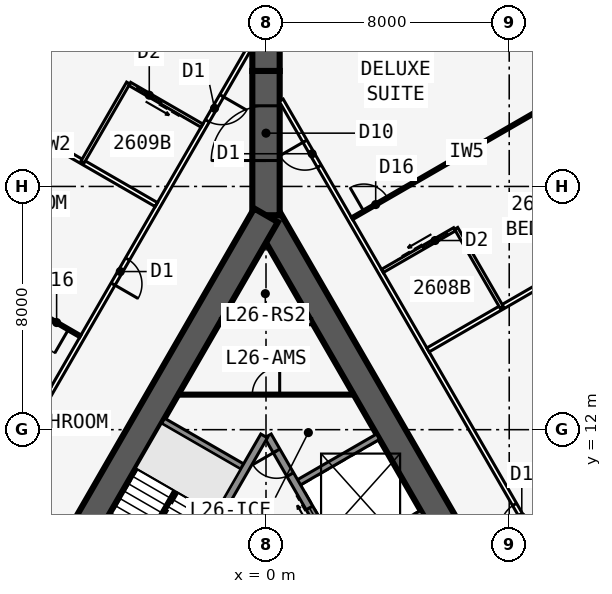
"""IFC4 building model, lengths in metres.
Left out: names, types, materials, properties, quantities, classifications, styles, units other than length and angle.
Written with IfcOpenShell. Run it as: python <this file> out.ifc"""

import sys

from ifc_helpers import new_model, si_unit, direction, frame, frame_2d, origin, place, context, subcontext, project, spatial, rectangle, extrude, element, fill, save


model = new_model("IFC4")
c1 = context("Model", 3, precision=1e-05, world=origin(), true_north=direction((0.0, 1.0)))
c2 = subcontext(c1, "Body", "Model", "MODEL_VIEW")
j1 = project(units=[si_unit("LENGTHUNIT", "METRE"), si_unit("PLANEANGLEUNIT", "RADIAN")], contexts=[c1])
p1 = place(None, origin())
s1 = spatial("IfcSite", under=j1, at=p1, CompositionType="ELEMENT")
p2 = place(p1, origin())
s2 = spatial("IfcBuilding", under=s1, at=p2, CompositionType="ELEMENT")
p3 = place(p2, frame((0.0, 0.0, 99.9)))
s3 = spatial("IfcBuildingStorey", under=s2, at=p3, CompositionType="ELEMENT", Elevation=99.9)
p4 = place(p3, frame((16.5, -9.526, 0.0), z_axis=(0.0, 0.0, 1.0), x_axis=(-0.499999749417, 0.866025548458, 0.0)))
e1 = element("IfcWall", 1, at=p4, inside=s3, PredefinedType="SHEAR", context=c2, shape_type="SweptSolid", body=[
    extrude(rectangle(XDim=33.0, YDim=0.9, at=frame_2d((16.5, 0.0))), origin(), (0.0, 0.0, 1.0), 3.4),
])
p5 = place(p4, frame((14.15, 0.0, 0.0)))
e2 = element("IfcOpeningElement", 2, at=p5, cuts=e1, PredefinedType="OPENING", context=c2, shape_type="SweptSolid", body=[
    extrude(rectangle(XDim=1.8, YDim=2.13, at=frame_2d((0.9, 1.065))), frame((0.0, 0.46, 0.0), z_axis=(0.0, -1.0, 0.0), x_axis=(1.0, 0.0, 0.0)), (0.0, 0.0, 1.0), 0.92),
])
p6 = place(p4, frame((12.6, 0.0, 0.0)))
e3 = element("IfcOpeningElement", 3, at=p6, cuts=e1, PredefinedType="OPENING", context=c2, shape_type="SweptSolid", body=[
    extrude(rectangle(XDim=1.0, YDim=2.13, at=frame_2d((0.5, 1.065))), frame((0.0, 0.46, 0.0), z_axis=(0.0, -1.0, 0.0), x_axis=(1.0, 0.0, 0.0)), (0.0, 0.0, 1.0), 0.92),
])
p7 = place(p3, frame((5.379, 2.586, 0.0), z_axis=(0.0, 0.0, 1.0), x_axis=(-0.500001375892, 0.866024609411, 0.0)))
e4 = element("IfcWall", 4, at=p7, inside=s3, PredefinedType="SOLIDWALL", context=c2, shape_type="SweptSolid", body=[
    extrude(rectangle(XDim=10.633, YDim=0.25, at=frame_2d((5.316, 0.0))), origin(), (0.0, 0.0, 1.0), 3.15),
])
p8 = place(p7, frame((9.164, 0.0, 0.0)))
e5 = element("IfcOpeningElement", 5, at=p8, cuts=e4, PredefinedType="OPENING", context=c2, shape_type="SweptSolid", body=[
    extrude(rectangle(XDim=0.9, YDim=2.13, at=frame_2d((0.45, 1.065))), frame((0.0, 0.135, 0.0), z_axis=(0.0, -1.0, 0.0), x_axis=(1.0, 0.0, 0.0)), (0.0, 0.0, 1.0), 0.27),
])
p9 = place(p7, frame((1.0, 0.0, 0.0)))
e6 = element("IfcOpeningElement", 6, at=p9, cuts=e4, PredefinedType="OPENING", context=c2, shape_type="SweptSolid", body=[
    extrude(rectangle(XDim=1.1, YDim=2.13, at=frame_2d((0.55, 1.065))), frame((0.0, 0.135, 0.0), z_axis=(0.0, -1.0, 0.0), x_axis=(1.0, 0.0, 0.0)), (0.0, 0.0, 1.0), 0.27),
])
p10 = place(p7, frame((3.9, 0.0, 0.0)))
e7 = element("IfcOpeningElement", 7, at=p10, cuts=e4, PredefinedType="OPENING", context=c2, shape_type="SweptSolid", body=[
    extrude(rectangle(XDim=1.1, YDim=2.13, at=frame_2d((0.55, 1.065))), frame((0.0, 0.135, 0.0), z_axis=(0.0, -1.0, 0.0), x_axis=(1.0, 0.0, 0.0)), (0.0, 0.0, 1.0), 0.27),
])
p11 = place(p7, frame((6.8, 0.0, 0.0)))
e8 = element("IfcOpeningElement", 8, at=p11, cuts=e4, PredefinedType="OPENING", context=c2, shape_type="SweptSolid", body=[
    extrude(rectangle(XDim=1.1, YDim=2.13, at=frame_2d((0.55, 1.065))), frame((0.0, 0.135, 0.0), z_axis=(0.0, -1.0, 0.0), x_axis=(1.0, 0.0, 0.0)), (0.0, 0.0, 1.0), 0.27),
])
for number, where, z_axis, x_axis in (
    (9, (2.429, 7.696, 0.0), (0.0, 0.0, 1.0), (0.866, 0.5, 0.0)),
    (10, (0.979, 10.207, 0.0), (0.0, 0.0, 1.0), (0.866, 0.5, 0.0)),
):
    element("IfcWall", number, at=place(p3, frame(where, z_axis=z_axis, x_axis=x_axis)), inside=s3, PredefinedType="SOLIDWALL", context=c2, shape_type="SweptSolid", body=[
        extrude(rectangle(XDim=3.125, YDim=0.2, at=frame_2d((1.562, 0.0))), origin(), (0.0, 0.0, 1.0), 3.15),
    ])
p12 = place(p3, frame((0.0, 19.052, 0.0), z_axis=(0.0, 0.0, 1.0), x_axis=(-0.499999749417, -0.866025548458, 0.0)))
e11 = element("IfcWall", 11, at=p12, inside=s3, PredefinedType="SHEAR", context=c2, shape_type="SweptSolid", body=[
    extrude(rectangle(XDim=33.0, YDim=0.9, at=frame_2d((16.5, 0.0))), origin(), (0.0, 0.0, 1.0), 3.4),
])
p13 = place(p12, frame((14.15, 0.0, 0.0)))
e12 = element("IfcOpeningElement", 12, at=p13, cuts=e11, PredefinedType="OPENING", context=c2, shape_type="SweptSolid", body=[
    extrude(rectangle(XDim=1.8, YDim=2.13, at=frame_2d((0.9, 1.065))), frame((0.0, 0.46, 0.0), z_axis=(0.0, -1.0, 0.0), x_axis=(1.0, 0.0, 0.0)), (0.0, 0.0, 1.0), 0.92),
])
p14 = place(p12, frame((12.6, 0.0, 0.0)))
e13 = element("IfcOpeningElement", 13, at=p14, cuts=e11, PredefinedType="OPENING", context=c2, shape_type="SweptSolid", body=[
    extrude(rectangle(XDim=1.0, YDim=2.13, at=frame_2d((0.5, 1.065))), frame((0.0, 0.46, 0.0), z_axis=(0.0, -1.0, 0.0), x_axis=(1.0, 0.0, 0.0)), (0.0, 0.0, 1.0), 0.92),
])
p15 = place(p3, frame((-0.062, 11.794, 0.0), z_axis=(0.0, 0.0, 1.0), x_axis=(-0.500006680225, -0.86602154692, 0.0)))
e14 = element("IfcWall", 14, at=p15, inside=s3, PredefinedType="SOLIDWALL", context=c2, shape_type="SweptSolid", body=[
    extrude(rectangle(XDim=7.733, YDim=0.25, at=frame_2d((3.866, 0.0))), origin(), (0.0, 0.0, 1.0), 3.15),
])
p16 = place(p3, frame((-0.679, 10.727, 0.0), z_axis=(0.0, 0.0, 1.0), x_axis=(-0.866022959057, 0.500004234368, 0.0)))
e15 = element("IfcWall", 15, at=p16, inside=s3, PredefinedType="SOLIDWALL", context=c2, shape_type="SweptSolid", body=[
    extrude(rectangle(XDim=3.125, YDim=0.2, at=frame_2d((1.562, 0.0))), origin(), (0.0, 0.0, 1.0), 3.15),
])
p17 = place(p3, frame((0.0, 19.052, 0.0), z_axis=(0.0, 0.0, 1.0), x_axis=(0.0, 1.0, 0.0)))
e16 = element("IfcWall", 16, at=p17, inside=s3, PredefinedType="SHEAR", context=c2, shape_type="SweptSolid", body=[
    extrude(rectangle(XDim=4.746, YDim=0.9, at=frame_2d((2.373, 0.0))), origin(), (0.0, 0.0, 1.0), 3.4),
])
p18 = place(p17, frame((1.8, 0.0, 0.0)))
e17 = element("IfcOpeningElement", 17, at=p18, cuts=e16, PredefinedType="OPENING", context=c2, shape_type="SweptSolid", body=[
    extrude(rectangle(XDim=1.8, YDim=2.13, at=frame_2d((0.9, 1.065))), frame((0.0, 0.46, 0.0), z_axis=(0.0, -1.0, 0.0), x_axis=(1.0, 0.0, 0.0)), (0.0, 0.0, 1.0), 0.92),
])
p19 = place(p3, frame((0.0, 23.799, 0.0), z_axis=(0.0, 0.0, 1.0), x_axis=(0.0, 1.0, 0.0)))
e18 = element("IfcWall", 18, at=p19, inside=s3, PredefinedType="SHEAR", context=c2, shape_type="SweptSolid", body=[
    extrude(rectangle(XDim=1.155, YDim=0.9, at=frame_2d((0.577, 0.0))), origin(), (0.0, 0.0, 1.0), 3.4),
])
p20 = place(p3, frame((10.511, 23.357, 0.0), z_axis=(0.0, 0.0, 1.0), x_axis=(-0.682289646561, 0.731081964075, 0.0)))
e19 = element("IfcWall", 19, at=p20, inside=s3, PredefinedType="STANDARD", context=c2, shape_type="SweptSolid", body=[
    extrude(rectangle(XDim=8.211, YDim=0.25, at=frame_2d((4.105, 0.0))), origin(), (0.0, 0.0, 1.0), 3.15),
])
p21 = place(p20, frame((2.006, 0.0, 0.45)))
e20 = element("IfcOpeningElement", 20, at=p21, cuts=e19, PredefinedType="OPENING", context=c2, shape_type="SweptSolid", body=[
    extrude(rectangle(XDim=4.2, YDim=2.4, at=frame_2d((2.1, 1.2))), frame((0.0, 0.135, 0.0), z_axis=(0.0, -1.0, 0.0), x_axis=(1.0, 0.0, 0.0)), (0.0, 0.0, 1.0), 0.27),
])
p22 = place(p3, frame((-4.909, 29.36, 0.0), z_axis=(0.0, 0.0, 1.0), x_axis=(-0.682289646561, -0.731081964075, 0.0)))
e21 = element("IfcWall", 21, at=p22, inside=s3, PredefinedType="STANDARD", context=c2, shape_type="SweptSolid", body=[
    extrude(rectangle(XDim=8.211, YDim=0.25, at=frame_2d((4.105, 0.0))), origin(), (0.0, 0.0, 1.0), 3.15),
])
p23 = place(p22, frame((2.006, 0.0, 0.45)))
e22 = element("IfcOpeningElement", 22, at=p23, cuts=e21, PredefinedType="OPENING", context=c2, shape_type="SweptSolid", body=[
    extrude(rectangle(XDim=4.2, YDim=2.4, at=frame_2d((2.1, 1.2))), frame((0.0, 0.135, 0.0), z_axis=(0.0, -1.0, 0.0), x_axis=(1.0, 0.0, 0.0)), (0.0, 0.0, 1.0), 0.27),
])
p24 = place(p3, frame((20.027, -10.985, 0.0), z_axis=(0.0, 0.0, 1.0), x_axis=(-0.500001677587, 0.866024435227, 0.0)))
e23 = element("IfcWall", 23, at=p24, inside=s3, PredefinedType="PARTITIONING", context=c2, shape_type="SweptSolid", body=[
    extrude(rectangle(XDim=39.054, YDim=0.15, at=frame_2d((19.527, 0.0))), origin(), (0.0, 0.0, 1.0), 3.15),
])
p25 = place(p24, frame((1.558, 0.0, 0.0)))
e24 = element("IfcOpeningElement", 24, at=p25, cuts=e23, PredefinedType="OPENING", context=c2, shape_type="SweptSolid", body=[
    extrude(rectangle(XDim=0.95, YDim=2.13, at=frame_2d((0.475, 1.065))), frame((0.0, 0.085, 0.0), z_axis=(0.0, -1.0, 0.0), x_axis=(1.0, 0.0, 0.0)), (0.0, 0.0, 1.0), 0.17),
])
p26 = place(p24, frame((11.552, 0.0, 0.0)))
e25 = element("IfcOpeningElement", 25, at=p26, cuts=e23, PredefinedType="OPENING", context=c2, shape_type="SweptSolid", body=[
    extrude(rectangle(XDim=0.95, YDim=2.13, at=frame_2d((0.475, 1.065))), frame((0.0, 0.085, 0.0), z_axis=(0.0, -1.0, 0.0), x_axis=(1.0, 0.0, 0.0)), (0.0, 0.0, 1.0), 0.17),
])
p27 = place(p24, frame((22.752, 0.0, 0.0)))
e26 = element("IfcOpeningElement", 26, at=p27, cuts=e23, PredefinedType="OPENING", context=c2, shape_type="SweptSolid", body=[
    extrude(rectangle(XDim=0.95, YDim=2.13, at=frame_2d((0.475, 1.065))), frame((0.0, 0.085, 0.0), z_axis=(0.0, -1.0, 0.0), x_axis=(1.0, 0.0, 0.0)), (0.0, 0.0, 1.0), 0.17),
])
p28 = place(p24, frame((36.546, 0.0, 0.0)))
e27 = element("IfcOpeningElement", 27, at=p28, cuts=e23, PredefinedType="OPENING", context=c2, shape_type="SweptSolid", body=[
    extrude(rectangle(XDim=0.95, YDim=2.13, at=frame_2d((0.475, 1.065))), frame((0.0, 0.085, 0.0), z_axis=(0.0, -1.0, 0.0), x_axis=(1.0, 0.0, 0.0)), (0.0, 0.0, 1.0), 0.17),
])
p29 = place(p3, frame((5.329, 14.623, 0.0), z_axis=(0.0, 0.0, 1.0), x_axis=(0.866018409083, 0.500012114982, 0.0)))
e28 = element("IfcWall", 28, at=p29, inside=s3, PredefinedType="PARTITIONING", context=c2, shape_type="SweptSolid", body=[
    extrude(rectangle(XDim=9.485, YDim=0.15, at=frame_2d((4.742, 0.0))), origin(), (0.0, 0.0, 1.0), 2.109),
])
p30 = place(p3, frame((2.829, 18.954, 0.0), z_axis=(0.0, 0.0, 1.0), x_axis=(0.866020536561, 0.500008430184, 0.0)))
e29 = element("IfcWall", 29, at=p30, inside=s3, PredefinedType="PARTITIONING", context=c2, shape_type="SweptSolid", body=[
    extrude(rectangle(XDim=8.72, YDim=0.1, at=frame_2d((4.36, 0.0))), origin(), (0.0, 0.0, 1.0), 2.05),
])
p31 = place(p30, frame((0.45, 0.0, 0.0)))
e30 = element("IfcOpeningElement", 30, at=p31, cuts=e29, PredefinedType="OPENING", context=c2, shape_type="SweptSolid", body=[
    extrude(rectangle(XDim=0.9, YDim=2.032, at=frame_2d((0.45, 1.016))), frame((0.0, 0.06, 0.0), z_axis=(0.0, -1.0, 0.0), x_axis=(1.0, 0.0, 0.0)), (0.0, 0.0, 1.0), 0.12),
])
p32 = place(p3, frame((7.753, 16.023, 0.0), z_axis=(0.0, 0.0, 1.0), x_axis=(-0.499990139034, 0.866031096941, 0.0)))
e31 = element("IfcWall", 31, at=p32, inside=s3, PredefinedType="PLUMBINGWALL", context=c2, shape_type="SweptSolid", body=[
    extrude(rectangle(XDim=3.0, YDim=0.12, at=frame_2d((1.5, 0.0))), origin(), (0.0, 0.0, 1.0), 3.15),
])
p33 = place(p3, frame((3.829, 17.221, 0.0), z_axis=(0.0, 0.0, 1.0), x_axis=(0.865997131366, 0.500048966069, 0.0)))
e32 = element("IfcWall", 32, at=p33, inside=s3, PredefinedType="PLUMBINGWALL", context=c2, shape_type="SweptSolid", body=[
    extrude(rectangle(XDim=2.74, YDim=0.12, at=frame_2d((1.37, 0.0))), origin(), (0.0, 0.0, 1.0), 3.15),
])
p34 = place(p33, frame((1.55, 0.0, 0.0)))
e33 = element("IfcOpeningElement", 33, at=p34, cuts=e32, PredefinedType="OPENING", context=c2, shape_type="SweptSolid", body=[
    extrude(rectangle(XDim=0.9, YDim=2.13, at=frame_2d((0.45, 1.065))), frame((0.0, 0.07, 0.0), z_axis=(0.0, -1.0, 0.0), x_axis=(1.0, 0.0, 0.0)), (0.0, 0.0, 1.0), 0.14),
])
p35 = place(p3, frame((-0.5, 24.636, 0.0), z_axis=(0.0, 0.0, 1.0), x_axis=(-0.500001915564, -0.86602429783, 0.0)))
e34 = element("IfcWall", 34, at=p35, inside=s3, PredefinedType="PARTITIONING", context=c2, shape_type="SweptSolid", body=[
    extrude(rectangle(XDim=42.172, YDim=0.15, at=frame_2d((21.086, 0.0))), origin(), (0.0, 0.0, 1.0), 3.15),
])
p36 = place(p35, frame((1.911, 0.0, 0.0)))
e35 = element("IfcOpeningElement", 35, at=p36, cuts=e34, PredefinedType="OPENING", context=c2, shape_type="SweptSolid", body=[
    extrude(rectangle(XDim=0.95, YDim=2.13, at=frame_2d((0.475, 1.065))), frame((0.0, 0.085, 0.0), z_axis=(0.0, -1.0, 0.0), x_axis=(1.0, 0.0, 0.0)), (0.0, 0.0, 1.0), 0.17),
])
p37 = place(p35, frame((8.111, 0.0, 0.0)))
e36 = element("IfcOpeningElement", 36, at=p37, cuts=e34, PredefinedType="OPENING", context=c2, shape_type="SweptSolid", body=[
    extrude(rectangle(XDim=0.95, YDim=2.13, at=frame_2d((0.475, 1.065))), frame((0.0, 0.085, 0.0), z_axis=(0.0, -1.0, 0.0), x_axis=(1.0, 0.0, 0.0)), (0.0, 0.0, 1.0), 0.17),
])
p38 = place(p35, frame((18.111, 0.0, 0.0)))
e37 = element("IfcOpeningElement", 37, at=p38, cuts=e34, PredefinedType="OPENING", context=c2, shape_type="SweptSolid", body=[
    extrude(rectangle(XDim=0.95, YDim=2.13, at=frame_2d((0.475, 1.065))), frame((0.0, 0.085, 0.0), z_axis=(0.0, -1.0, 0.0), x_axis=(1.0, 0.0, 0.0)), (0.0, 0.0, 1.0), 0.17),
])
p39 = place(p35, frame((28.711, 0.0, 0.0)))
e38 = element("IfcOpeningElement", 38, at=p39, cuts=e34, PredefinedType="OPENING", context=c2, shape_type="SweptSolid", body=[
    extrude(rectangle(XDim=0.95, YDim=2.13, at=frame_2d((0.475, 1.065))), frame((0.0, 0.085, 0.0), z_axis=(0.0, -1.0, 0.0), x_axis=(1.0, 0.0, 0.0)), (0.0, 0.0, 1.0), 0.17),
])
p40 = place(p35, frame((33.711, 0.0, 0.0)))
e39 = element("IfcOpeningElement", 39, at=p40, cuts=e34, PredefinedType="OPENING", context=c2, shape_type="SweptSolid", body=[
    extrude(rectangle(XDim=0.95, YDim=2.13, at=frame_2d((0.475, 1.065))), frame((0.0, 0.085, 0.0), z_axis=(0.0, -1.0, 0.0), x_axis=(1.0, 0.0, 0.0)), (0.0, 0.0, 1.0), 0.17),
])
p41 = place(p35, frame((39.311, 0.0, 0.0)))
e40 = element("IfcOpeningElement", 40, at=p41, cuts=e34, PredefinedType="OPENING", context=c2, shape_type="SweptSolid", body=[
    extrude(rectangle(XDim=0.95, YDim=2.13, at=frame_2d((0.475, 1.065))), frame((0.0, 0.085, 0.0), z_axis=(0.0, -1.0, 0.0), x_axis=(1.0, 0.0, 0.0)), (0.0, 0.0, 1.0), 0.17),
])
p42 = place(p3, frame((-3.608, 19.404, 0.0), z_axis=(0.0, 0.0, 1.0), x_axis=(-0.866021300503, 0.500007107024, 0.0)))
e41 = element("IfcWall", 41, at=p42, inside=s3, PredefinedType="PARTITIONING", context=c2, shape_type="SweptSolid", body=[
    extrude(rectangle(XDim=7.82, YDim=0.15, at=frame_2d((3.91, 0.0))), origin(), (0.0, 0.0, 1.0), 2.05),
])
p43 = place(p3, frame((-6.108, 15.073, 0.0), z_axis=(0.0, 0.0, 1.0), x_axis=(-0.866031196456, 0.499989966665, 0.0)))
e42 = element("IfcWall", 42, at=p43, inside=s3, PredefinedType="PARTITIONING", context=c2, shape_type="SweptSolid", body=[
    extrude(rectangle(XDim=8.585, YDim=0.1, at=frame_2d((4.292, 0.0))), origin(), (0.0, 0.0, 1.0), 2.109),
])
p44 = place(p43, frame((0.45, 0.0, 0.0)))
e43 = element("IfcOpeningElement", 43, at=p44, cuts=e42, PredefinedType="OPENING", context=c2, shape_type="SweptSolid", body=[
    extrude(rectangle(XDim=0.9, YDim=2.032, at=frame_2d((0.45, 1.016))), frame((0.0, 0.06, 0.0), z_axis=(0.0, -1.0, 0.0), x_axis=(1.0, 0.0, 0.0)), (0.0, 0.0, 1.0), 0.12),
])
p45 = place(p3, frame((-4.533, 23.402, 0.0), z_axis=(0.0, 0.0, 1.0), x_axis=(-0.499990139034, -0.866031096941, 0.0)))
e44 = element("IfcWall", 44, at=p45, inside=s3, PredefinedType="PLUMBINGWALL", context=c2, shape_type="SweptSolid", body=[
    extrude(rectangle(XDim=3.0, YDim=0.12, at=frame_2d((1.5, 0.0))), origin(), (0.0, 0.0, 1.0), 3.15),
])
p46 = place(p3, frame((-2.108, 22.002, 0.0), z_axis=(0.0, 0.0, 1.0), x_axis=(-0.866035715982, 0.499982138324, 0.0)))
e45 = element("IfcWall", 45, at=p46, inside=s3, PredefinedType="PLUMBINGWALL", context=c2, shape_type="SweptSolid", body=[
    extrude(rectangle(XDim=2.74, YDim=0.12, at=frame_2d((1.37, 0.0))), origin(), (0.0, 0.0, 1.0), 3.15),
])
p47 = place(p46, frame((1.55, 0.0, 0.0)))
e46 = element("IfcOpeningElement", 46, at=p47, cuts=e45, PredefinedType="OPENING", context=c2, shape_type="SweptSolid", body=[
    extrude(rectangle(XDim=0.9, YDim=2.13, at=frame_2d((0.45, 1.065))), frame((0.0, 0.07, 0.0), z_axis=(0.0, -1.0, 0.0), x_axis=(1.0, 0.0, 0.0)), (0.0, 0.0, 1.0), 0.14),
])
p48 = place(p3, frame((-1.501, 15.552, 0.0), z_axis=(0.0, 0.0, 1.0), x_axis=(1.0, 0.0, 0.0)))
e47 = element("IfcWall", 47, at=p48, inside=s3, PredefinedType="SOLIDWALL", context=c2, shape_type="SweptSolid", body=[
    extrude(rectangle(XDim=3.002, YDim=0.2, at=frame_2d((1.501, 0.0))), origin(), (0.0, 0.0, 1.0), 3.15),
])
p49 = place(p3, frame((-2.887, 13.153, 0.0), z_axis=(0.0, 0.0, 1.0), x_axis=(1.0, 0.0, 0.0)))
e48 = element("IfcWall", 48, at=p49, inside=s3, PredefinedType="PARTITIONING", context=c2, shape_type="SweptSolid", body=[
    extrude(rectangle(XDim=5.773, YDim=0.1, at=frame_2d((2.887, 0.0))), origin(), (0.0, 0.0, 1.0), 3.15),
])
p50 = place(p49, frame((2.437, 0.0, 0.0)))
e49 = element("IfcOpeningElement", 49, at=p50, cuts=e48, PredefinedType="OPENING", context=c2, shape_type="SweptSolid", body=[
    extrude(rectangle(XDim=0.9, YDim=2.13, at=frame_2d((0.45, 1.065))), frame((0.0, 0.06, 0.0), z_axis=(0.0, -1.0, 0.0), x_axis=(1.0, 0.0, 0.0)), (0.0, 0.0, 1.0), 0.12),
])
p51 = place(p3, frame((-2.988, 9.978, 0.0), z_axis=(0.0, 0.0, 1.0), x_axis=(-0.499992232847, -0.866029888106, 0.0)))
e50 = element("IfcWall", 50, at=p51, inside=s3, PredefinedType="SOLIDWALL", context=c2, shape_type="SweptSolid", body=[
    extrude(rectangle(XDim=2.794, YDim=0.1, at=frame_2d((1.397, 0.0))), origin(), (0.0, 0.0, 1.0), 3.4),
])
p52 = place(p31, origin())
e51 = element("IfcDoor", 51, at=p52, inside=s3, OperationType="SINGLE_SWING_LEFT", PredefinedType="DOOR", context=c2, shape_type="SweptSolid", body=[
    extrude(rectangle(XDim=0.9, YDim=2.032, at=frame_2d((0.45, 1.016))), frame((0.0, 0.025, 0.0), z_axis=(0.0, -1.0, 0.0), x_axis=(1.0, 0.0, 0.0)), (0.0, 0.0, 1.0), 0.05),
])
fill(e30, e51)
p53 = place(p27, origin())
e52 = element("IfcDoor", 52, at=p53, inside=s3, OperationType="SINGLE_SWING_LEFT", PredefinedType="DOOR", context=c2, shape_type="SweptSolid", body=[
    extrude(rectangle(XDim=0.95, YDim=2.13, at=frame_2d((0.475, 1.065))), frame((0.0, 0.025, 0.0), z_axis=(0.0, -1.0, 0.0), x_axis=(1.0, 0.0, 0.0)), (0.0, 0.0, 1.0), 0.05),
])
fill(e26, e52)
p54 = place(p34, origin())
e53 = element("IfcDoor", 53, at=p54, inside=s3, OperationType="SLIDING_TO_LEFT", PredefinedType="DOOR", context=c2, shape_type="SweptSolid", body=[
    extrude(rectangle(XDim=0.9, YDim=2.13, at=frame_2d((0.45, 1.065))), frame((0.0, 0.025, 0.0), z_axis=(0.0, -1.0, 0.0), x_axis=(1.0, 0.0, 0.0)), (0.0, 0.0, 1.0), 0.05),
])
fill(e33, e53)
p55 = place(p28, origin())
e54 = element("IfcDoor", 54, at=p55, inside=s3, OperationType="SINGLE_SWING_RIGHT", PredefinedType="DOOR", context=c2, shape_type="SweptSolid", body=[
    extrude(rectangle(XDim=0.95, YDim=2.13, at=frame_2d((0.475, 1.065))), frame((0.0, 0.025, 0.0), z_axis=(0.0, -1.0, 0.0), x_axis=(1.0, 0.0, 0.0)), (0.0, 0.0, 1.0), 0.05),
])
fill(e27, e54)
p56 = place(p44, origin())
e55 = element("IfcDoor", 55, at=p56, inside=s3, OperationType="SINGLE_SWING_LEFT", PredefinedType="DOOR", context=c2, shape_type="SweptSolid", body=[
    extrude(rectangle(XDim=0.9, YDim=2.032, at=frame_2d((0.45, 1.016))), frame((0.0, 0.025, 0.0), z_axis=(0.0, -1.0, 0.0), x_axis=(1.0, 0.0, 0.0)), (0.0, 0.0, 1.0), 0.05),
])
fill(e43, e55)
p57 = place(p47, origin())
e56 = element("IfcDoor", 56, at=p57, inside=s3, OperationType="SLIDING_TO_LEFT", PredefinedType="DOOR", context=c2, shape_type="SweptSolid", body=[
    extrude(rectangle(XDim=0.9, YDim=2.13, at=frame_2d((0.45, 1.065))), frame((0.0, 0.025, 0.0), z_axis=(0.0, -1.0, 0.0), x_axis=(1.0, 0.0, 0.0)), (0.0, 0.0, 1.0), 0.05),
])
fill(e46, e56)
p58 = place(p36, origin())
e57 = element("IfcDoor", 57, at=p58, inside=s3, OperationType="SINGLE_SWING_LEFT", PredefinedType="DOOR", context=c2, shape_type="SweptSolid", body=[
    extrude(rectangle(XDim=0.95, YDim=2.13, at=frame_2d((0.475, 1.065))), frame((0.0, 0.025, 0.0), z_axis=(0.0, -1.0, 0.0), x_axis=(1.0, 0.0, 0.0)), (0.0, 0.0, 1.0), 0.05),
])
fill(e35, e57)
p59 = place(p37, origin())
e58 = element("IfcDoor", 58, at=p59, inside=s3, OperationType="SINGLE_SWING_RIGHT", PredefinedType="DOOR", context=c2, shape_type="SweptSolid", body=[
    extrude(rectangle(XDim=0.95, YDim=2.13, at=frame_2d((0.475, 1.065))), frame((0.0, 0.025, 0.0), z_axis=(0.0, -1.0, 0.0), x_axis=(1.0, 0.0, 0.0)), (0.0, 0.0, 1.0), 0.05),
])
fill(e36, e58)
p60 = place(p18, origin())
e59 = element("IfcDoor", 59, at=p60, inside=s3, OperationType="DOUBLE_DOOR_DOUBLE_SWING", PredefinedType="DOOR", context=c2, shape_type="SweptSolid", body=[
    extrude(rectangle(XDim=1.8, YDim=2.13, at=frame_2d((0.9, 1.065))), frame((0.0, 0.025, 0.0), z_axis=(0.0, -1.0, 0.0), x_axis=(1.0, 0.0, 0.0)), (0.0, 0.0, 1.0), 0.05),
])
fill(e17, e59)
p61 = place(p50, origin())
e60 = element("IfcDoor", 60, at=p61, inside=s3, OperationType="SINGLE_SWING_RIGHT", PredefinedType="DOOR", context=c2, shape_type="SweptSolid", body=[
    extrude(rectangle(XDim=0.9, YDim=2.13, at=frame_2d((0.45, 1.065))), frame((0.0, 0.025, 0.0), z_axis=(0.0, -1.0, 0.0), x_axis=(1.0, 0.0, 0.0)), (0.0, 0.0, 1.0), 0.05),
])
fill(e49, e60)
p62 = place(p8, origin())
e61 = element("IfcDoor", 61, at=p62, inside=s3, OperationType="SINGLE_SWING_RIGHT", PredefinedType="DOOR", context=c2, shape_type="SweptSolid", body=[
    extrude(rectangle(XDim=0.9, YDim=2.13, at=frame_2d((0.45, 1.065))), frame((0.0, 0.025, 0.0), z_axis=(0.0, -1.0, 0.0), x_axis=(1.0, 0.0, 0.0)), (0.0, 0.0, 1.0), 0.05),
])
fill(e5, e61)
p63 = place(p11, origin())
e62 = element("IfcDoor", 62, at=p63, inside=s3, OperationType="DOUBLE_DOOR_SLIDING", PredefinedType="USERDEFINED", context=c2, shape_type="SweptSolid", body=[
    extrude(rectangle(XDim=1.1, YDim=2.13, at=frame_2d((0.55, 1.065))), frame((0.0, 0.025, 0.0), z_axis=(0.0, -1.0, 0.0), x_axis=(1.0, 0.0, 0.0)), (0.0, 0.0, 1.0), 0.05),
])
fill(e8, e62)
save(model, sys.argv[1])
